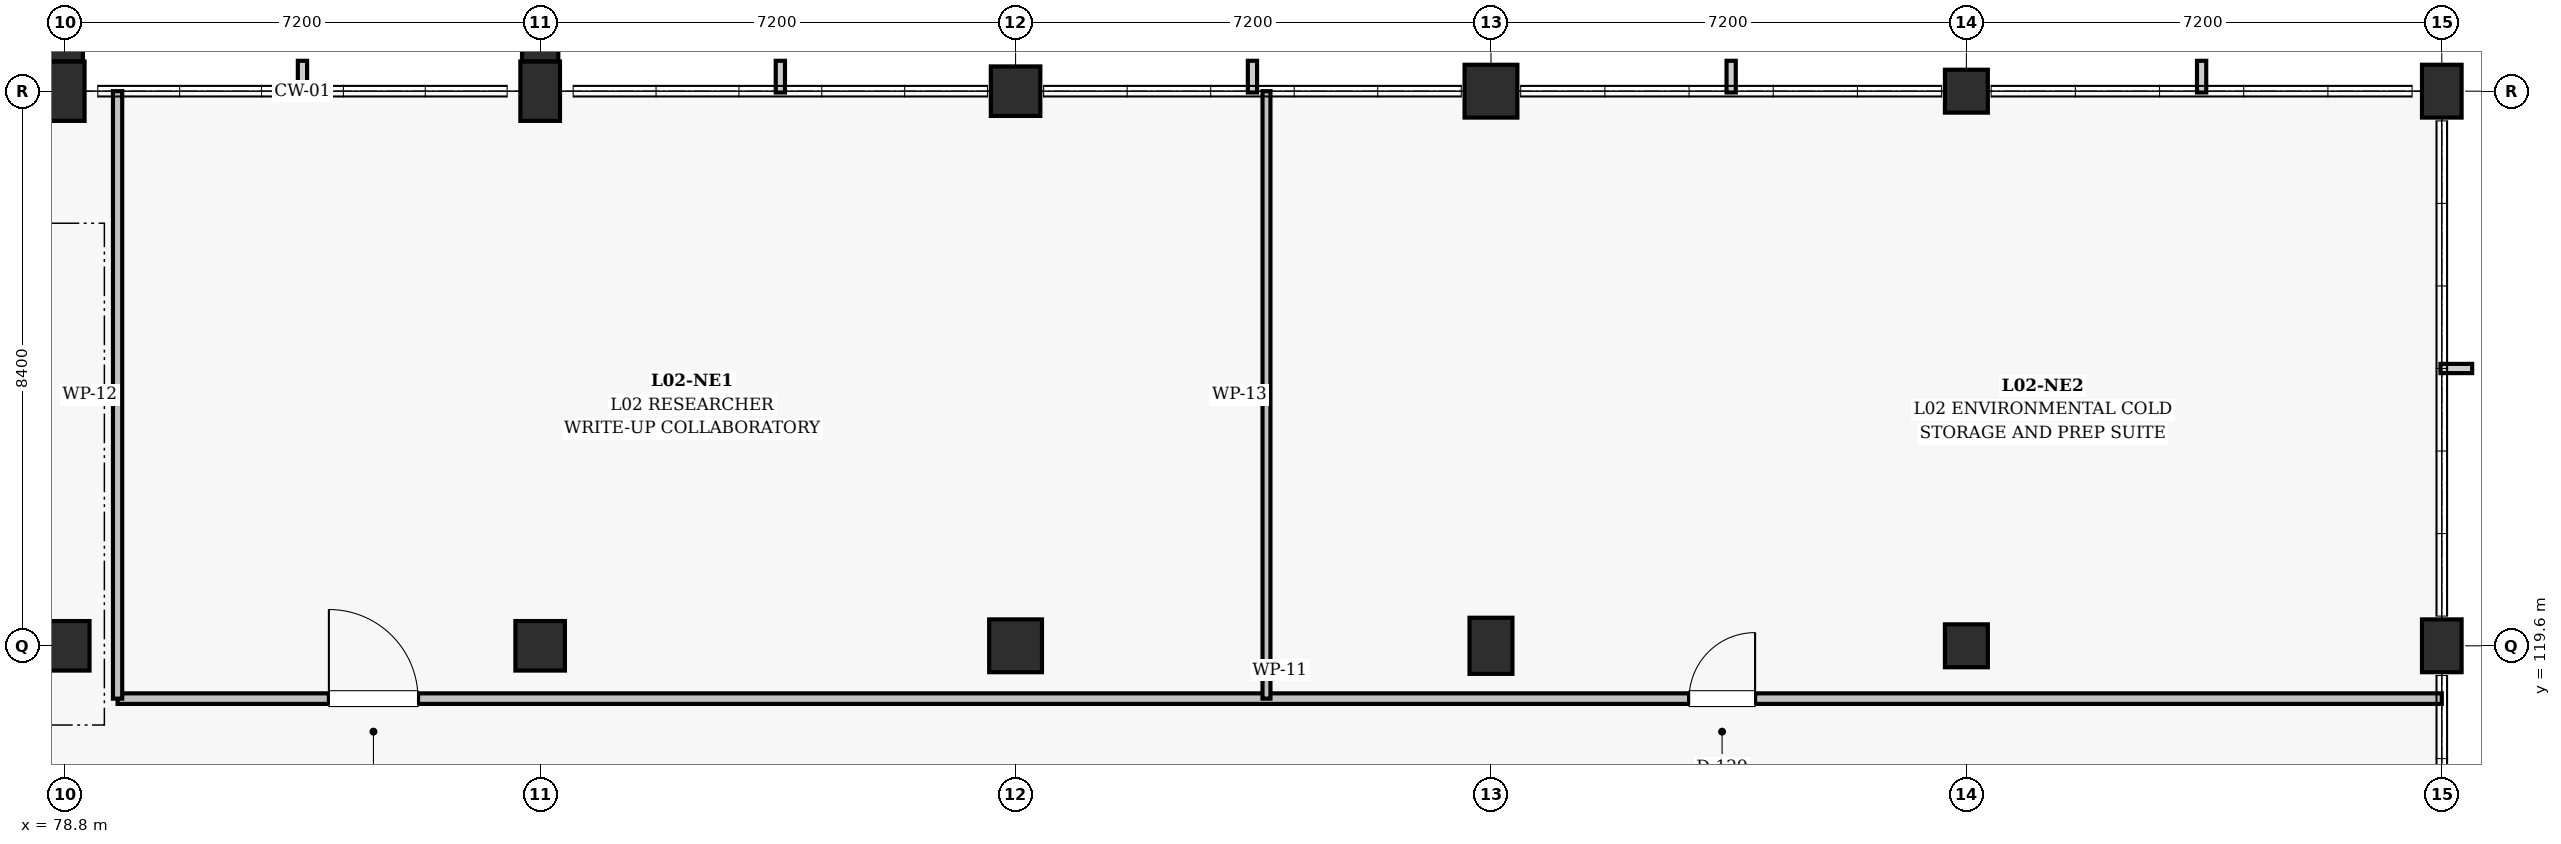
"""IFC4 building model, lengths in metres.
Left out: names, types, materials, properties, quantities, classifications, styles, units other than length and angle.
Written with IfcOpenShell. Run it as: python <this file> out.ifc"""

import sys

from ifc_helpers import new_model, si_unit, direction, frame, frame_2d, origin, origin_2d, place, context, subcontext, project, spatial, rectangle, extrude, element, fill, save


model = new_model("IFC4")
c1 = context("Model", 3, precision=1e-05, world=origin(), true_north=direction((0.0, 1.0)))
c2 = subcontext(c1, "Body", "Model", "MODEL_VIEW")
j1 = project(units=[si_unit("LENGTHUNIT", "METRE"), si_unit("PLANEANGLEUNIT", "RADIAN")], contexts=[c1])
p1 = place(None, origin())
s1 = spatial("IfcSite", under=j1, at=p1, CompositionType="ELEMENT")
p2 = place(p1, origin())
s2 = spatial("IfcBuilding", under=s1, at=p2, CompositionType="ELEMENT")
p3 = place(p2, frame((0.0, 0.0, 9.9)))
s3 = spatial("IfcBuildingStorey", under=s2, at=p3, CompositionType="ELEMENT", Elevation=9.9)
p4 = place(p3, frame((78.8, 119.6, 0.0), z_axis=(0.0, 0.0, 1.0), x_axis=(1.0, 0.0, 0.0)))
e1 = element("IfcColumn", 1, at=p4, inside=s3, PredefinedType="COLUMN", context=c2, shape_type="SweptSolid", body=[
    extrude(rectangle(XDim=0.75, YDim=0.75, at=origin_2d()), origin(), (0.0, 0.0, 1.0), 4.5),
])
p5 = place(p3, frame((78.8, 128.0, 0.0), z_axis=(0.0, 0.0, 1.0), x_axis=(1.0, 0.0, 0.0)))
e2 = element("IfcColumn", 2, at=p5, inside=s3, PredefinedType="COLUMN", context=c2, shape_type="SweptSolid", body=[
    extrude(rectangle(XDim=0.6, YDim=0.9, at=origin_2d()), origin(), (0.0, 0.0, 1.0), 4.5),
])
p6 = place(p3, frame((86.0, 119.6, 0.0), z_axis=(0.0, 0.0, 1.0), x_axis=(1.0, 0.0, 0.0)))
e3 = element("IfcColumn", 3, at=p6, inside=s3, PredefinedType="COLUMN", context=c2, shape_type="SweptSolid", body=[
    extrude(rectangle(XDim=0.75, YDim=0.75, at=origin_2d()), origin(), (0.0, 0.0, 1.0), 4.5),
])
p7 = place(p3, frame((86.0, 128.0, 0.0), z_axis=(0.0, 0.0, 1.0), x_axis=(1.0, 0.0, 0.0)))
e4 = element("IfcColumn", 4, at=p7, inside=s3, PredefinedType="COLUMN", context=c2, shape_type="SweptSolid", body=[
    extrude(rectangle(XDim=0.6, YDim=0.9, at=origin_2d()), origin(), (0.0, 0.0, 1.0), 4.5),
])
p8 = place(p3, frame((93.2, 119.6, 0.0), z_axis=(0.0, 0.0, 1.0), x_axis=(1.0, 0.0, 0.0)))
e5 = element("IfcColumn", 5, at=p8, inside=s3, PredefinedType="COLUMN", context=c2, shape_type="SweptSolid", body=[
    extrude(rectangle(XDim=0.8, YDim=0.8, at=origin_2d()), origin(), (0.0, 0.0, 1.0), 4.5),
])
p9 = place(p3, frame((93.2, 128.0, 0.0), z_axis=(0.0, 0.0, 1.0), x_axis=(1.0, 0.0, 0.0)))
e6 = element("IfcColumn", 6, at=p9, inside=s3, PredefinedType="COLUMN", context=c2, shape_type="SweptSolid", body=[
    extrude(rectangle(XDim=0.75, YDim=0.75, at=origin_2d()), origin(), (0.0, 0.0, 1.0), 4.5),
])
p10 = place(p3, frame((100.4, 119.6, 0.0), z_axis=(0.0, 0.0, 1.0), x_axis=(1.0, 0.0, 0.0)))
e7 = element("IfcColumn", 7, at=p10, inside=s3, PredefinedType="COLUMN", context=c2, shape_type="SweptSolid", body=[
    extrude(rectangle(XDim=0.65, YDim=0.85, at=origin_2d()), origin(), (0.0, 0.0, 1.0), 4.5),
])
p11 = place(p3, frame((100.4, 128.0, 0.0), z_axis=(0.0, 0.0, 1.0), x_axis=(1.0, 0.0, 0.0)))
e8 = element("IfcColumn", 8, at=p11, inside=s3, PredefinedType="COLUMN", context=c2, shape_type="SweptSolid", body=[
    extrude(rectangle(XDim=0.8, YDim=0.8, at=origin_2d()), origin(), (0.0, 0.0, 1.0), 4.5),
])
for number, where, z_axis, x_axis in (
    (9, (107.6, 119.6, 0.0), (0.0, 0.0, 1.0), (1.0, 0.0, 0.0)),
    (10, (107.6, 128.0, 0.0), (0.0, 0.0, 1.0), (1.0, 0.0, 0.0)),
):
    element("IfcColumn", number, at=place(p3, frame(where, z_axis=z_axis, x_axis=x_axis)), inside=s3, PredefinedType="COLUMN", context=c2, shape_type="SweptSolid", body=[
        extrude(rectangle(XDim=0.65, YDim=0.65, at=origin_2d()), origin(), (0.0, 0.0, 1.0), 4.5),
    ])
for number, where, z_axis, x_axis in (
    (11, (114.8, 119.6, 0.0), (0.0, 0.0, 1.0), (1.0, 0.0, 0.0)),
    (12, (114.8, 128.0, 0.0), (0.0, 0.0, 1.0), (1.0, 0.0, 0.0)),
):
    element("IfcColumn", number, at=place(p3, frame(where, z_axis=z_axis, x_axis=x_axis)), inside=s3, PredefinedType="COLUMN", context=c2, shape_type="SweptSolid", body=[
        extrude(rectangle(XDim=0.6, YDim=0.8, at=origin_2d()), origin(), (0.0, 0.0, 1.0), 4.5),
    ])
for number, where, z_axis, x_axis in (
    (13, (78.8, 128.853, 0.0), (0.0, 0.0, 1.0), (1.0, 0.0, 0.0)),
    (14, (86.0, 128.853, 0.0), (0.0, 0.0, 1.0), (1.0, 0.0, 0.0)),
):
    element("IfcColumn", number, at=place(p3, frame(where, z_axis=z_axis, x_axis=x_axis)), inside=s3, PredefinedType="PILASTER", context=c2, shape_type="SweptSolid", body=[
        extrude(rectangle(XDim=0.55, YDim=0.8, at=origin_2d()), origin(), (0.0, 0.0, 1.0), 4.5),
    ])
p12 = place(p3, frame((79.6, 118.8, 0.0), z_axis=(0.0, 0.0, 1.0), x_axis=(1.0, 0.0, 0.0)))
e15 = element("IfcWall", 15, at=p12, inside=s3, PredefinedType="PARTITIONING", context=c2, shape_type="SweptSolid", body=[
    extrude(rectangle(XDim=35.2, YDim=0.16, at=frame_2d((17.6, 0.0))), origin(), (0.0, 0.0, 1.0), 2.96),
])
p13 = place(p12, frame((3.2, 0.0, 0.0)))
e16 = element("IfcOpeningElement", 16, at=p13, cuts=e15, PredefinedType="OPENING", context=c2, shape_type="SweptSolid", body=[
    extrude(rectangle(XDim=1.35, YDim=2.2, at=frame_2d((0.675, 1.1))), frame((0.0, 0.09, 0.0), z_axis=(0.0, -1.0, 0.0), x_axis=(1.0, 0.0, 0.0)), (0.0, 0.0, 1.0), 0.18),
])
p14 = place(p12, frame((23.8, 0.0, 0.0)))
e17 = element("IfcOpeningElement", 17, at=p14, cuts=e15, PredefinedType="OPENING", context=c2, shape_type="SweptSolid", body=[
    extrude(rectangle(XDim=1.0, YDim=2.15, at=frame_2d((0.5, 1.075))), frame((0.0, 0.09, 0.0), z_axis=(0.0, -1.0, 0.0), x_axis=(1.0, 0.0, 0.0)), (0.0, 0.0, 1.0), 0.18),
])
p15 = place(p3, frame((79.6, 118.8, 0.0), z_axis=(0.0, 0.0, 1.0), x_axis=(0.0, 1.0, 0.0)))
e18 = element("IfcWall", 18, at=p15, inside=s3, PredefinedType="PARTITIONING", context=c2, shape_type="SweptSolid", body=[
    extrude(rectangle(XDim=9.2, YDim=0.14, at=frame_2d((4.6, 0.0))), origin(), (0.0, 0.0, 1.0), 3.51),
])
p16 = place(p3, frame((97.0, 118.8, 0.0), z_axis=(0.0, 0.0, 1.0), x_axis=(0.0, 1.0, 0.0)))
e19 = element("IfcWall", 19, at=p16, inside=s3, PredefinedType="PARTITIONING", context=c2, shape_type="SweptSolid", body=[
    extrude(rectangle(XDim=9.2, YDim=0.12, at=frame_2d((4.6, 0.0))), origin(), (0.0, 0.0, 1.0), 3.36),
])
p17 = place(p13, origin())
e20 = element("IfcDoor", 20, at=p17, inside=s3, OperationType="SINGLE_SWING_LEFT", PredefinedType="DOOR", context=c2, shape_type="SweptSolid", body=[
    extrude(rectangle(XDim=1.35, YDim=2.2, at=frame_2d((0.675, 1.1))), frame((0.0, 0.025, 0.0), z_axis=(0.0, -1.0, 0.0), x_axis=(1.0, 0.0, 0.0)), (0.0, 0.0, 1.0), 0.05),
])
fill(e16, e20)
p18 = place(p14, origin())
e21 = element("IfcDoor", 21, at=p18, inside=s3, OperationType="SINGLE_SWING_RIGHT", PredefinedType="DOOR", context=c2, shape_type="SweptSolid", body=[
    extrude(rectangle(XDim=1.0, YDim=2.15, at=frame_2d((0.5, 1.075))), frame((0.0, 0.025, 0.0), z_axis=(0.0, -1.0, 0.0), x_axis=(1.0, 0.0, 0.0)), (0.0, 0.0, 1.0), 0.05),
])
fill(e17, e21)
save(model, sys.argv[1])
